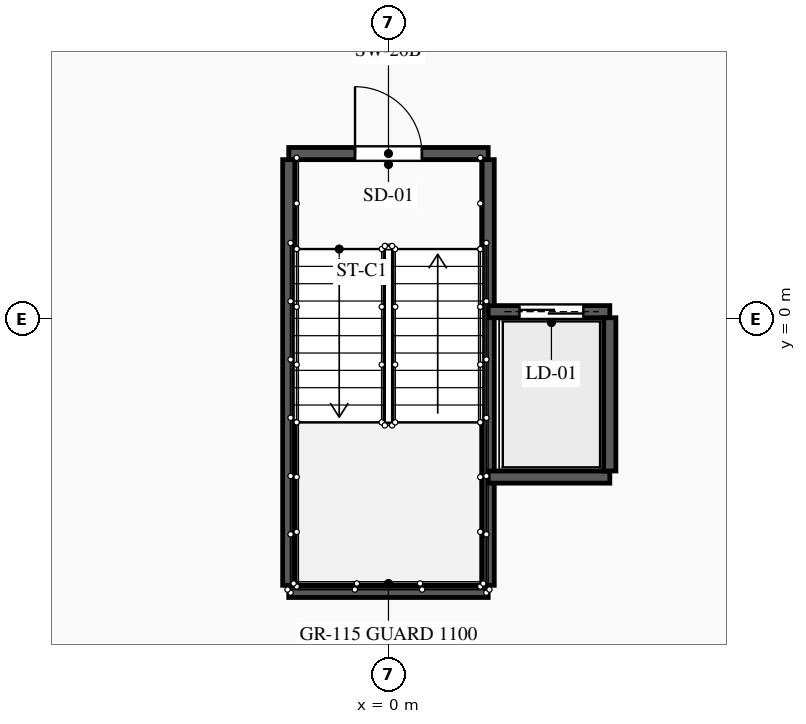
"""IFC4 building model, lengths in metres.
Left out: names, types, materials, properties, quantities, classifications, styles, units other than length and angle.
Written with IfcOpenShell. Run it as: python <this file> out.ifc"""

import sys

from ifc_helpers import new_model, si_unit, direction, frame, frame_2d, origin, place, context, subcontext, project, spatial, rectangle, extrude, element, fill, save


model = new_model("IFC4")
c1 = context("Model", 3, precision=1e-05, world=origin(), true_north=direction((0.0, 1.0)))
c2 = subcontext(c1, "Body", "Model", "MODEL_VIEW")
j1 = project(units=[si_unit("LENGTHUNIT", "METRE"), si_unit("PLANEANGLEUNIT", "RADIAN")], contexts=[c1])
p1 = place(None, origin())
s1 = spatial("IfcSite", under=j1, at=p1, CompositionType="ELEMENT")
p2 = place(p1, origin())
s2 = spatial("IfcBuilding", under=s1, at=p2, CompositionType="ELEMENT")
p3 = place(p2, frame((0.0, 0.0, 281.6)))
s3 = spatial("IfcBuildingStorey", under=s2, at=p3, CompositionType="ELEMENT", Elevation=281.6)
p4 = place(p3, frame((-1.64, 2.72, 0.0), z_axis=(0.0, 0.0, 1.0), x_axis=(1.0, 0.0, 0.0)))
e1 = element("IfcWall", 1, at=p4, inside=s3, PredefinedType="SHEAR", context=c2, shape_type="SweptSolid", body=[
    extrude(rectangle(XDim=3.28, YDim=0.2, at=frame_2d((1.64, 0.0))), origin(), (0.0, 0.0, 1.0), 3.4),
])
p5 = place(p4, frame((1.09, 0.0, 0.0)))
e2 = element("IfcOpeningElement", 2, at=p5, cuts=e1, PredefinedType="OPENING", context=c2, shape_type="SweptSolid", body=[
    extrude(rectangle(XDim=1.1, YDim=2.15, at=frame_2d((0.55, 1.075))), frame((0.0, 0.11, 0.0), z_axis=(0.0, -1.0, 0.0), x_axis=(1.0, 0.0, 0.0)), (0.0, 0.0, 1.0), 0.22),
])
p6 = place(p3, frame((-1.64, -4.48, 0.0), z_axis=(0.0, 0.0, 1.0), x_axis=(1.0, 0.0, 0.0)))
e3 = element("IfcWall", 3, at=p6, inside=s3, PredefinedType="SHEAR", context=c2, shape_type="SweptSolid", body=[
    extrude(rectangle(XDim=3.28, YDim=0.2, at=frame_2d((1.64, 0.0))), origin(), (0.0, 0.0, 1.0), 3.4),
])
for number, where, z_axis, x_axis in (
    (4, (-1.64, -4.38, 0.0), (0.0, 0.0, 1.0), (0.0, 1.0, 0.0)),
    (5, (1.64, -4.38, 0.0), (0.0, 0.0, 1.0), (0.0, 1.0, 0.0)),
):
    element("IfcWall", number, at=place(p3, frame(where, z_axis=z_axis, x_axis=x_axis)), inside=s3, PredefinedType="SHEAR", context=c2, shape_type="SweptSolid", body=[
        extrude(rectangle(XDim=7.0, YDim=0.2, at=frame_2d((3.5, 0.0))), origin(), (0.0, 0.0, 1.0), 3.4),
    ])
p7 = place(p3, frame((1.64, 0.12, 0.0), z_axis=(0.0, 0.0, 1.0), x_axis=(1.0, 0.0, 0.0)))
e6 = element("IfcWall", 6, at=p7, inside=s3, PredefinedType="SHEAR", context=c2, shape_type="SweptSolid", body=[
    extrude(rectangle(XDim=2.0, YDim=0.2, at=frame_2d((1.0, 0.0))), origin(), (0.0, 0.0, 1.0), 3.4),
])
p8 = place(p7, frame((0.515, 0.0, 0.0)))
e7 = element("IfcOpeningElement", 7, at=p8, cuts=e6, PredefinedType="OPENING", context=c2, shape_type="SweptSolid", body=[
    extrude(rectangle(XDim=1.05, YDim=2.1, at=frame_2d((0.525, 1.05))), frame((0.0, 0.11, 0.0), z_axis=(0.0, -1.0, 0.0), x_axis=(1.0, 0.0, 0.0)), (0.0, 0.0, 1.0), 0.22),
])
p9 = place(p3, frame((1.64, -2.6, 0.0), z_axis=(0.0, 0.0, 1.0), x_axis=(1.0, 0.0, 0.0)))
e8 = element("IfcWall", 8, at=p9, inside=s3, PredefinedType="SHEAR", context=c2, shape_type="SweptSolid", body=[
    extrude(rectangle(XDim=2.0, YDim=0.2, at=frame_2d((1.0, 0.0))), origin(), (0.0, 0.0, 1.0), 3.4),
])
p10 = place(p3, frame((3.64, -2.5, 0.0), z_axis=(0.0, 0.0, 1.0), x_axis=(0.0, 1.0, 0.0)))
e9 = element("IfcWall", 9, at=p10, inside=s3, PredefinedType="SHEAR", context=c2, shape_type="SweptSolid", body=[
    extrude(rectangle(XDim=2.52, YDim=0.2, at=frame_2d((1.26, 0.0))), origin(), (0.0, 0.0, 1.0), 3.4),
])
p11 = place(p5, origin())
e10 = element("IfcDoor", 10, at=p11, inside=s3, OperationType="SINGLE_SWING_LEFT", PredefinedType="DOOR", context=c2, shape_type="SweptSolid", body=[
    extrude(rectangle(XDim=1.1, YDim=2.15, at=frame_2d((0.55, 1.075))), frame((0.0, 0.025, 0.0), z_axis=(0.0, -1.0, 0.0), x_axis=(1.0, 0.0, 0.0)), (0.0, 0.0, 1.0), 0.05),
])
fill(e2, e10)
p12 = place(p8, origin())
e11 = element("IfcDoor", 11, at=p12, inside=s3, OperationType="DOUBLE_DOOR_SLIDING", PredefinedType="DOOR", context=c2, shape_type="SweptSolid", body=[
    extrude(rectangle(XDim=1.05, YDim=2.1, at=frame_2d((0.525, 1.05))), frame((0.0, 0.025, 0.0), z_axis=(0.0, -1.0, 0.0), x_axis=(1.0, 0.0, 0.0)), (0.0, 0.0, 1.0), 0.05),
])
fill(e7, e11)
save(model, sys.argv[1])
